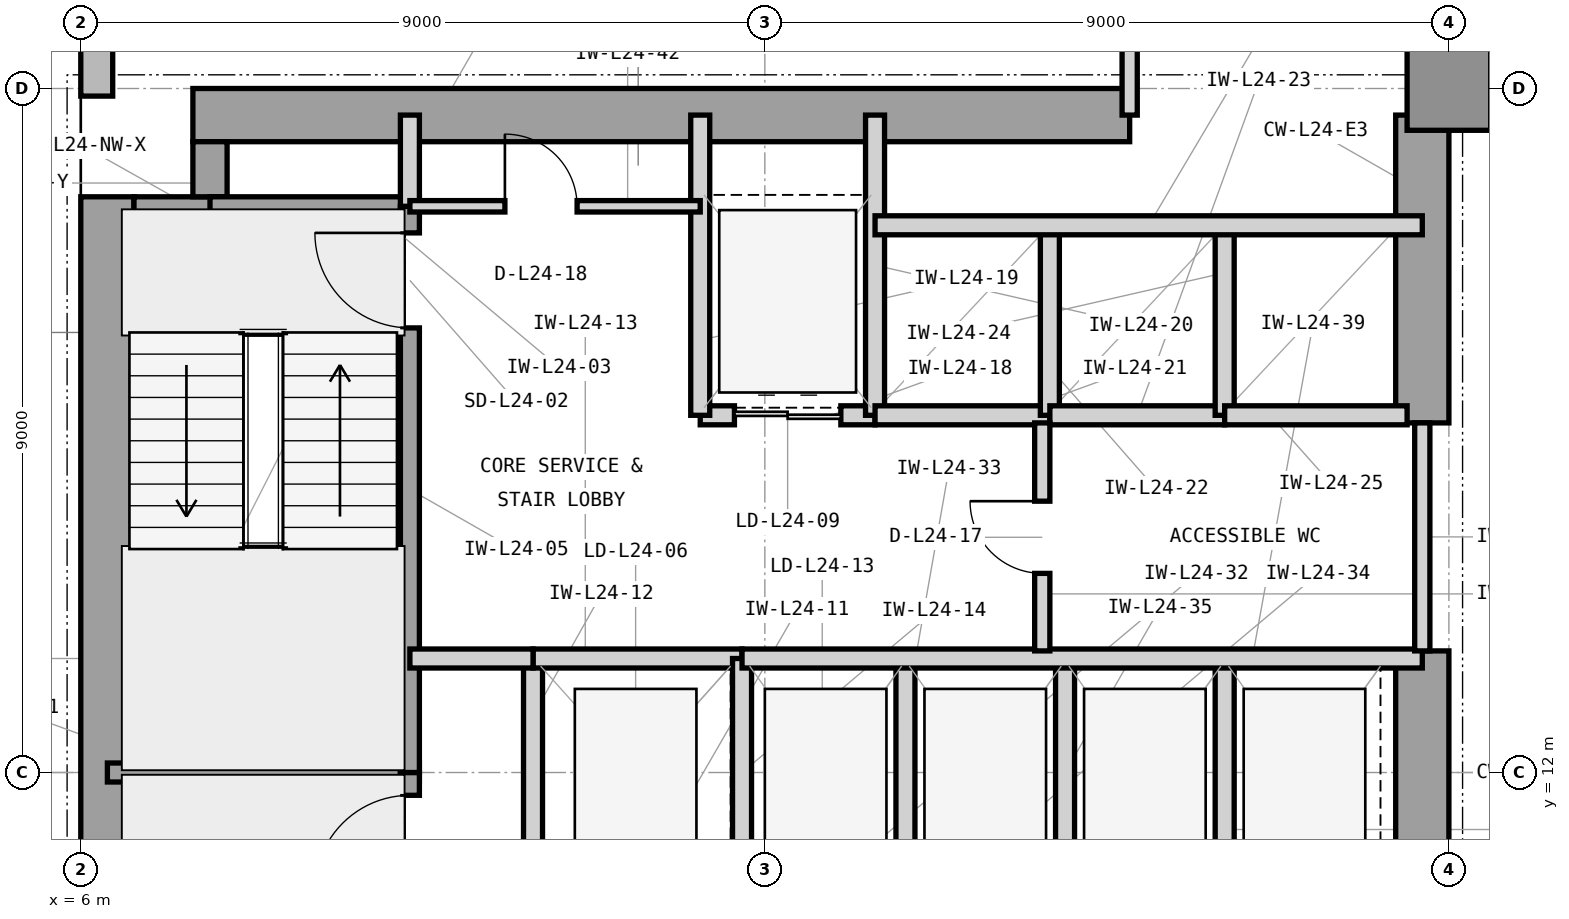
"""IFC4 building model, lengths in metres.
Left out: names, types, materials, properties, quantities, classifications, styles, units other than length and angle.
Written with IfcOpenShell. Run it as: python <this file> out.ifc"""

import sys

from ifc_helpers import new_model, si_unit, direction, frame, frame_2d, origin, origin_2d, place, context, subcontext, project, spatial, rectangle, extrude, element, fill, save


model = new_model("IFC4")
c1 = context("Model", 3, precision=1e-05, world=origin(), true_north=direction((0.0, 1.0)))
c2 = subcontext(c1, "Body", "Model", "MODEL_VIEW")
j1 = project(units=[si_unit("LENGTHUNIT", "METRE"), si_unit("PLANEANGLEUNIT", "RADIAN")], contexts=[c1])
p1 = place(None, origin())
s1 = spatial("IfcSite", under=j1, at=p1, CompositionType="ELEMENT")
p2 = place(p1, origin())
s2 = spatial("IfcBuilding", under=s1, at=p2, CompositionType="ELEMENT")
p3 = place(p2, frame((0.0, 0.0, 105.0)))
s3 = spatial("IfcBuildingStorey", under=s2, at=p3, CompositionType="ELEMENT", Elevation=105.0)
p4 = place(p3, frame((6.35, 4.425, 0.0), z_axis=(0.0, 0.0, 1.0), x_axis=(0.0, 1.0, 0.0)))
e1 = element("IfcWall", 1, at=p4, inside=s3, PredefinedType="SHEAR", context=c2, shape_type="SweptSolid", body=[
    extrude(rectangle(XDim=15.15, YDim=0.7, at=frame_2d((7.575, 0.0))), origin(), (0.0, 0.0, 1.0), 3.9),
])
p5 = place(p3, frame((7.475, 20.65, 0.0), z_axis=(0.0, 0.0, 1.0), x_axis=(1.0, 0.0, 0.0)))
e2 = element("IfcWall", 2, at=p5, inside=s3, PredefinedType="SHEAR", context=c2, shape_type="SweptSolid", body=[
    extrude(rectangle(XDim=12.325, YDim=0.7, at=frame_2d((6.163, 0.0))), origin(), (0.0, 0.0, 1.0), 3.9),
])
p6 = place(p3, frame((23.65, 10.4, 0.0), z_axis=(0.0, 0.0, 1.0), x_axis=(0.0, 1.0, 0.0)))
e3 = element("IfcWall", 3, at=p6, inside=s3, PredefinedType="SHEAR", context=c2, shape_type="SweptSolid", body=[
    extrude(rectangle(XDim=3.2, YDim=0.7, at=frame_2d((1.6, 0.0))), origin(), (0.0, 0.0, 1.0), 3.9),
])
p7 = place(p3, frame((23.65, 16.6, 0.0), z_axis=(0.0, 0.0, 1.0), x_axis=(0.0, 1.0, 0.0)))
e4 = element("IfcWall", 4, at=p7, inside=s3, PredefinedType="SHEAR", context=c2, shape_type="SweptSolid", body=[
    extrude(rectangle(XDim=4.05, YDim=0.7, at=frame_2d((2.025, 0.0))), origin(), (0.0, 0.0, 1.0), 3.9),
])
p8 = place(p3, frame((6.7, 19.35, 0.0), z_axis=(0.0, 0.0, 1.0), x_axis=(1.0, 0.0, 0.0)))
e5 = element("IfcWall", 5, at=p8, inside=s3, PredefinedType="SHEAR", context=c2, shape_type="SweptSolid", body=[
    extrude(rectangle(XDim=1.225, YDim=0.45, at=frame_2d((0.613, 0.0))), origin(), (0.0, 0.0, 1.0), 3.9),
])
p9 = place(p3, frame((7.7, 19.575, 0.0), z_axis=(0.0, 0.0, 1.0), x_axis=(0.0, 1.0, 0.0)))
e6 = element("IfcWall", 6, at=p9, inside=s3, PredefinedType="SHEAR", context=c2, shape_type="SweptSolid", body=[
    extrude(rectangle(XDim=0.725, YDim=0.45, at=frame_2d((0.363, 0.0))), origin(), (0.0, 0.0, 1.0), 3.9),
])
p10 = place(p3, frame((24.0, 21.0, 0.0), z_axis=(0.0, 0.0, 1.0), x_axis=(1.0, 0.0, 0.0)))
e7 = element("IfcColumn", 7, at=p10, inside=s3, PredefinedType="COLUMN", context=c2, shape_type="SweptSolid", body=[
    extrude(rectangle(XDim=1.1, YDim=1.1, at=origin_2d()), origin(), (0.0, 0.0, 1.0), 3.9),
])
p11 = place(p3, frame((61.4, 20.79, 0.0), z_axis=(0.0, 0.0, 1.0), x_axis=(-1.0, 0.0, 0.0)))
e8 = element("IfcWall", 8, at=p11, inside=s3, PredefinedType="STANDARD", context=c2, shape_type="SweptSolid", body=[
    extrude(rectangle(XDim=37.4, YDim=0.42, at=frame_2d((18.7, 0.0))), origin(), (0.0, 0.0, 1.0), 3.7),
])
p12 = place(p11, frame((15.113, 0.0, 0.85)))
e9 = element("IfcOpeningElement", 9, at=p12, cuts=e8, PredefinedType="OPENING", context=c2, shape_type="SweptSolid", body=[
    extrude(rectangle(XDim=2.5, YDim=2.25, at=frame_2d((1.25, 1.125))), frame((0.0, 0.22, 0.0), z_axis=(0.0, -1.0, 0.0), x_axis=(1.0, 0.0, 0.0)), (0.0, 0.0, 1.0), 0.44),
])
p13 = place(p11, frame((24.462, 0.0, 0.85)))
e10 = element("IfcOpeningElement", 10, at=p13, cuts=e8, PredefinedType="OPENING", context=c2, shape_type="SweptSolid", body=[
    extrude(rectangle(XDim=2.5, YDim=2.25, at=frame_2d((1.25, 1.125))), frame((0.0, 0.22, 0.0), z_axis=(0.0, -1.0, 0.0), x_axis=(1.0, 0.0, 0.0)), (0.0, 0.0, 1.0), 0.44),
])
p14 = place(p3, frame((23.79, 21.0, 0.0), z_axis=(0.0, 0.0, 1.0), x_axis=(0.0, 1.0, 0.0)))
e11 = element("IfcWall", 11, at=p14, inside=s3, PredefinedType="STANDARD", context=c2, shape_type="SweptSolid", body=[
    extrude(rectangle(XDim=25.4, YDim=0.42, at=frame_2d((12.7, 0.0))), origin(), (0.0, 0.0, 1.0), 3.7),
])
p15 = place(p14, frame((11.45, 0.0, 0.85)))
e12 = element("IfcOpeningElement", 12, at=p15, cuts=e11, PredefinedType="OPENING", context=c2, shape_type="SweptSolid", body=[
    extrude(rectangle(XDim=2.5, YDim=2.25, at=frame_2d((1.25, 1.125))), frame((0.0, 0.22, 0.0), z_axis=(0.0, -1.0, 0.0), x_axis=(1.0, 0.0, 0.0)), (0.0, 0.0, 1.0), 0.44),
])
p16 = place(p14, frame((18.866, 0.0, 0.85)))
e13 = element("IfcOpeningElement", 13, at=p16, cuts=e11, PredefinedType="OPENING", context=c2, shape_type="SweptSolid", body=[
    extrude(rectangle(XDim=1.2, YDim=2.25, at=frame_2d((0.6, 1.125))), frame((0.0, 0.22, 0.0), z_axis=(0.0, -1.0, 0.0), x_axis=(1.0, 0.0, 0.0)), (0.0, 0.0, 1.0), 0.44),
])
p17 = place(p3, frame((6.21, 46.4, 0.0), z_axis=(0.0, 0.0, 1.0), x_axis=(0.0, -1.0, 0.0)))
e14 = element("IfcWall", 14, at=p17, inside=s3, PredefinedType="STANDARD", context=c2, shape_type="SweptSolid", body=[
    extrude(rectangle(XDim=25.5, YDim=0.42, at=frame_2d((12.75, 0.0))), origin(), (0.0, 0.0, 1.0), 3.7),
])
p18 = place(p17, frame((11.5, 0.0, 0.85)))
e15 = element("IfcOpeningElement", 15, at=p18, cuts=e14, PredefinedType="OPENING", context=c2, shape_type="SweptSolid", body=[
    extrude(rectangle(XDim=2.5, YDim=2.25, at=frame_2d((1.25, 1.125))), frame((0.0, 0.22, 0.0), z_axis=(0.0, -1.0, 0.0), x_axis=(1.0, 0.0, 0.0)), (0.0, 0.0, 1.0), 0.44),
])
p19 = place(p17, frame((5.336, 0.0, 0.85)))
e16 = element("IfcOpeningElement", 16, at=p19, cuts=e14, PredefinedType="OPENING", context=c2, shape_type="SweptSolid", body=[
    extrude(rectangle(XDim=1.2, YDim=2.25, at=frame_2d((0.6, 1.125))), frame((0.0, 0.22, 0.0), z_axis=(0.0, -1.0, 0.0), x_axis=(1.0, 0.0, 0.0)), (0.0, 0.0, 1.0), 0.44),
])
p20 = place(p3, frame((6.35, 12.0, 0.0), z_axis=(0.0, 0.0, 1.0), x_axis=(1.0, 0.0, 0.0)))
e17 = element("IfcWall", 17, at=p20, inside=s3, PredefinedType="SHEAR", context=c2, shape_type="SweptSolid", body=[
    extrude(rectangle(XDim=4.105, YDim=0.25, at=frame_2d((2.052, 0.0))), origin(), (0.0, 0.0, 1.0), 3.9),
])
p21 = place(p3, frame((7.7, 19.45, 0.0), z_axis=(0.0, 0.0, 1.0), x_axis=(1.0, 0.0, 0.0)))
e18 = element("IfcWall", 18, at=p21, inside=s3, PredefinedType="SHEAR", context=c2, shape_type="SweptSolid", body=[
    extrude(rectangle(XDim=2.755, YDim=0.25, at=frame_2d((1.377, 0.0))), origin(), (0.0, 0.0, 1.0), 3.9),
])
p22 = place(p3, frame((10.33, 4.55, 0.0), z_axis=(0.0, 0.0, 1.0), x_axis=(0.0, 1.0, 0.0)))
e19 = element("IfcWall", 19, at=p22, inside=s3, PredefinedType="SHEAR", context=c2, shape_type="SweptSolid", body=[
    extrude(rectangle(XDim=7.45, YDim=0.25, at=frame_2d((3.725, 0.0))), origin(), (0.0, 0.0, 1.0), 3.9),
])
p23 = place(p22, frame((5.9, 0.0, 0.0)))
e20 = element("IfcOpeningElement", 20, at=p23, cuts=e19, PredefinedType="OPENING", context=c2, shape_type="SweptSolid", body=[
    extrude(rectangle(XDim=1.25, YDim=2.2, at=frame_2d((0.625, 1.1))), frame((0.0, 0.135, 0.0), z_axis=(0.0, -1.0, 0.0), x_axis=(1.0, 0.0, 0.0)), (0.0, 0.0, 1.0), 0.27),
])
p24 = place(p3, frame((10.33, 12.0, 0.0), z_axis=(0.0, 0.0, 1.0), x_axis=(0.0, 1.0, 0.0)))
e21 = element("IfcWall", 21, at=p24, inside=s3, PredefinedType="SHEAR", context=c2, shape_type="SweptSolid", body=[
    extrude(rectangle(XDim=7.45, YDim=0.25, at=frame_2d((3.725, 0.0))), origin(), (0.0, 0.0, 1.0), 3.9),
])
p25 = place(p24, frame((5.85, 0.0, 0.0)))
e22 = element("IfcOpeningElement", 22, at=p25, cuts=e21, PredefinedType="OPENING", context=c2, shape_type="SweptSolid", body=[
    extrude(rectangle(XDim=1.25, YDim=2.2, at=frame_2d((0.625, 1.1))), frame((0.0, 0.135, 0.0), z_axis=(0.0, -1.0, 0.0), x_axis=(1.0, 0.0, 0.0)), (0.0, 0.0, 1.0), 0.27),
])
p26 = place(p3, frame((10.33, 19.45, 0.0), z_axis=(0.0, 0.0, 1.0), x_axis=(0.0, 1.0, 0.0)))
e23 = element("IfcWall", 23, at=p26, inside=s3, PredefinedType="PARTITIONING", context=c2, shape_type="SweptSolid", body=[
    extrude(rectangle(XDim=1.2, YDim=0.25, at=frame_2d((0.6, 0.0))), origin(), (0.0, 0.0, 1.0), 2.917),
])
p27 = place(p3, frame((11.95, 10.5, 0.0), z_axis=(0.0, 0.0, 1.0), x_axis=(0.0, 1.0, 0.0)))
e24 = element("IfcWall", 24, at=p27, inside=s3, PredefinedType="PARTITIONING", context=c2, shape_type="SweptSolid", body=[
    extrude(rectangle(XDim=3.0, YDim=0.25, at=frame_2d((1.5, 0.0))), origin(), (0.0, 0.0, 1.0), 3.69),
])
p28 = place(p3, frame((11.95, 13.5, 0.0), z_axis=(0.0, 0.0, 1.0), x_axis=(1.0, 0.0, 0.0)))
e25 = element("IfcWall", 25, at=p28, inside=s3, PredefinedType="PARTITIONING", context=c2, shape_type="SweptSolid", body=[
    extrude(rectangle(XDim=2.75, YDim=0.25, at=frame_2d((1.375, 0.0))), origin(), (0.0, 0.0, 1.0), 3.227),
])
p29 = place(p3, frame((14.7, 10.5, 0.0), z_axis=(0.0, 0.0, 1.0), x_axis=(0.0, 1.0, 0.0)))
e26 = element("IfcWall", 26, at=p29, inside=s3, PredefinedType="PARTITIONING", context=c2, shape_type="SweptSolid", body=[
    extrude(rectangle(XDim=3.0, YDim=0.25, at=frame_2d((1.5, 0.0))), origin(), (0.0, 0.0, 1.0), 3.69),
])
p30 = place(p3, frame((10.33, 13.5, 0.0), z_axis=(0.0, 0.0, 1.0), x_axis=(1.0, 0.0, 0.0)))
e27 = element("IfcWall", 27, at=p30, inside=s3, PredefinedType="PARTITIONING", context=c2, shape_type="SweptSolid", body=[
    extrude(rectangle(XDim=1.62, YDim=0.25, at=frame_2d((0.81, 0.0))), origin(), (0.0, 0.0, 1.0), 3.227),
])
p31 = place(p3, frame((14.15, 16.7, 0.0), z_axis=(0.0, 0.0, 1.0), x_axis=(1.0, 0.0, 0.0)))
e28 = element("IfcWall", 28, at=p31, inside=s3, PredefinedType="PARTITIONING", context=c2, shape_type="SweptSolid", body=[
    extrude(rectangle(XDim=2.3, YDim=0.25, at=frame_2d((1.15, 0.0))), origin(), (0.0, 0.0, 1.0), 3.227),
])
p32 = place(p31, frame((0.45, 0.0, 0.0)))
e29 = element("IfcOpeningElement", 29, at=p32, cuts=e28, PredefinedType="OPENING", context=c2, shape_type="SweptSolid", body=[
    extrude(rectangle(XDim=1.4, YDim=2.35, at=frame_2d((0.7, 1.175))), frame((0.0, 0.135, 0.0), z_axis=(0.0, -1.0, 0.0), x_axis=(1.0, 0.0, 0.0)), (0.0, 0.0, 1.0), 0.27),
])
for number, where, z_axis, x_axis in (
    (30, (14.15, 16.7, 0.0), (0.0, 0.0, 1.0), (0.0, 1.0, 0.0)),
    (31, (16.45, 16.7, 0.0), (0.0, 0.0, 1.0), (0.0, 1.0, 0.0)),
):
    element("IfcWall", number, at=place(p3, frame(where, z_axis=z_axis, x_axis=x_axis)), inside=s3, PredefinedType="PARTITIONING", context=c2, shape_type="SweptSolid", body=[
        extrude(rectangle(XDim=3.95, YDim=0.25, at=frame_2d((1.975, 0.0))), origin(), (0.0, 0.0, 1.0), 3.69),
    ])
p33 = place(p3, frame((16.45, 16.7, 0.0), z_axis=(0.0, 0.0, 1.0), x_axis=(1.0, 0.0, 0.0)))
e32 = element("IfcWall", 32, at=p33, inside=s3, PredefinedType="PARTITIONING", context=c2, shape_type="SweptSolid", body=[
    extrude(rectangle(XDim=2.3, YDim=0.25, at=frame_2d((1.15, 0.0))), origin(), (0.0, 0.0, 1.0), 3.227),
])
p34 = place(p3, frame((18.75, 16.7, 0.0), z_axis=(0.0, 0.0, 1.0), x_axis=(0.0, 1.0, 0.0)))
e33 = element("IfcWall", 33, at=p34, inside=s3, PredefinedType="PARTITIONING", context=c2, shape_type="SweptSolid", body=[
    extrude(rectangle(XDim=2.5, YDim=0.25, at=frame_2d((1.25, 0.0))), origin(), (0.0, 0.0, 1.0), 3.69),
])
p35 = place(p3, frame((18.75, 16.7, 0.0), z_axis=(0.0, 0.0, 1.0), x_axis=(1.0, 0.0, 0.0)))
e34 = element("IfcWall", 34, at=p35, inside=s3, PredefinedType="PARTITIONING", context=c2, shape_type="SweptSolid", body=[
    extrude(rectangle(XDim=2.3, YDim=0.25, at=frame_2d((1.15, 0.0))), origin(), (0.0, 0.0, 1.0), 3.227),
])
p36 = place(p3, frame((21.05, 16.7, 0.0), z_axis=(0.0, 0.0, 1.0), x_axis=(0.0, 1.0, 0.0)))
e35 = element("IfcWall", 35, at=p36, inside=s3, PredefinedType="PARTITIONING", context=c2, shape_type="SweptSolid", body=[
    extrude(rectangle(XDim=2.5, YDim=0.25, at=frame_2d((1.25, 0.0))), origin(), (0.0, 0.0, 1.0), 3.69),
])
p37 = place(p3, frame((21.05, 16.7, 0.0), z_axis=(0.0, 0.0, 1.0), x_axis=(1.0, 0.0, 0.0)))
e36 = element("IfcWall", 36, at=p37, inside=s3, PredefinedType="PARTITIONING", context=c2, shape_type="SweptSolid", body=[
    extrude(rectangle(XDim=2.4, YDim=0.25, at=frame_2d((1.2, 0.0))), origin(), (0.0, 0.0, 1.0), 3.227),
])
p38 = place(p3, frame((16.45, 19.2, 0.0), z_axis=(0.0, 0.0, 1.0), x_axis=(1.0, 0.0, 0.0)))
e37 = element("IfcWall", 37, at=p38, inside=s3, PredefinedType="PARTITIONING", context=c2, shape_type="SweptSolid", body=[
    extrude(rectangle(XDim=7.2, YDim=0.25, at=frame_2d((3.6, 0.0))), origin(), (0.0, 0.0, 1.0), 3.69),
])
for number, where, z_axis, x_axis in (
    (38, (16.85, 10.5, 0.0), (0.0, 0.0, 1.0), (0.0, 1.0, 0.0)),
    (39, (18.95, 10.5, 0.0), (0.0, 0.0, 1.0), (0.0, 1.0, 0.0)),
    (40, (21.05, 10.5, 0.0), (0.0, 0.0, 1.0), (0.0, 1.0, 0.0)),
):
    element("IfcWall", number, at=place(p3, frame(where, z_axis=z_axis, x_axis=x_axis)), inside=s3, PredefinedType="PARTITIONING", context=c2, shape_type="SweptSolid", body=[
        extrude(rectangle(XDim=3.0, YDim=0.25, at=frame_2d((1.5, 0.0))), origin(), (0.0, 0.0, 1.0), 3.69),
    ])
p39 = place(p3, frame((14.7, 13.5, 0.0), z_axis=(0.0, 0.0, 1.0), x_axis=(1.0, 0.0, 0.0)))
e41 = element("IfcWall", 41, at=p39, inside=s3, PredefinedType="PARTITIONING", context=c2, shape_type="SweptSolid", body=[
    extrude(rectangle(XDim=8.95, YDim=0.25, at=frame_2d((4.475, 0.0))), origin(), (0.0, 0.0, 1.0), 3.227),
])
p40 = place(p3, frame((18.65, 13.6, 0.0), z_axis=(0.0, 0.0, 1.0), x_axis=(0.0, 1.0, 0.0)))
e42 = element("IfcWall", 42, at=p40, inside=s3, PredefinedType="PARTITIONING", context=c2, shape_type="SweptSolid", body=[
    extrude(rectangle(XDim=3.0, YDim=0.2, at=frame_2d((1.5, 0.0))), origin(), (0.0, 0.0, 1.0), 3.69),
])
p41 = place(p40, frame((1.02, 0.0, 0.0)))
e43 = element("IfcOpeningElement", 43, at=p41, cuts=e42, PredefinedType="OPENING", context=c2, shape_type="SweptSolid", body=[
    extrude(rectangle(XDim=0.95, YDim=2.1, at=frame_2d((0.475, 1.05))), frame((0.0, 0.11, 0.0), z_axis=(0.0, -1.0, 0.0), x_axis=(1.0, 0.0, 0.0)), (0.0, 0.0, 1.0), 0.22),
])
p42 = place(p3, frame((23.65, 13.6, 0.0), z_axis=(0.0, 0.0, 1.0), x_axis=(0.0, 1.0, 0.0)))
e44 = element("IfcWall", 44, at=p42, inside=s3, PredefinedType="PARTITIONING", context=c2, shape_type="SweptSolid", body=[
    extrude(rectangle(XDim=3.0, YDim=0.2, at=frame_2d((1.5, 0.0))), origin(), (0.0, 0.0, 1.0), 3.69),
])
p43 = place(p3, frame((10.33, 19.45, 0.0), z_axis=(0.0, 0.0, 1.0), x_axis=(1.0, 0.0, 0.0)))
e45 = element("IfcWall", 45, at=p43, inside=s3, PredefinedType="PARTITIONING", context=c2, shape_type="SweptSolid", body=[
    extrude(rectangle(XDim=3.82, YDim=0.15, at=frame_2d((1.91, 0.0))), origin(), (0.0, 0.0, 1.0), 3.69),
])
p44 = place(p43, frame((1.25, 0.0, 0.0)))
e46 = element("IfcOpeningElement", 46, at=p44, cuts=e45, PredefinedType="OPENING", context=c2, shape_type="SweptSolid", body=[
    extrude(rectangle(XDim=0.95, YDim=2.1, at=frame_2d((0.475, 1.05))), frame((0.0, 0.085, 0.0), z_axis=(0.0, -1.0, 0.0), x_axis=(1.0, 0.0, 0.0)), (0.0, 0.0, 1.0), 0.17),
])
p45 = place(p3, frame((19.8, 20.65, 0.0), z_axis=(0.0, 0.0, 1.0), x_axis=(0.0, 1.0, 0.0)))
e47 = element("IfcWall", 47, at=p45, inside=s3, PredefinedType="PARTITIONING", context=c2, shape_type="SweptSolid", body=[
    extrude(rectangle(XDim=6.15, YDim=0.2, at=frame_2d((3.075, 0.0))), origin(), (0.0, 0.0, 1.0), 3.69),
])
p46 = place(p23, origin())
e48 = element("IfcDoor", 48, at=p46, inside=s3, OperationType="SINGLE_SWING_LEFT", PredefinedType="DOOR", context=c2, shape_type="SweptSolid", body=[
    extrude(rectangle(XDim=1.25, YDim=2.2, at=frame_2d((0.625, 1.1))), frame((0.0, 0.025, 0.0), z_axis=(0.0, -1.0, 0.0), x_axis=(1.0, 0.0, 0.0)), (0.0, 0.0, 1.0), 0.05),
])
fill(e20, e48)
p47 = place(p25, origin())
e49 = element("IfcDoor", 49, at=p47, inside=s3, OperationType="SINGLE_SWING_RIGHT", PredefinedType="DOOR", context=c2, shape_type="SweptSolid", body=[
    extrude(rectangle(XDim=1.25, YDim=2.2, at=frame_2d((0.625, 1.1))), frame((0.0, 0.025, 0.0), z_axis=(0.0, -1.0, 0.0), x_axis=(1.0, 0.0, 0.0)), (0.0, 0.0, 1.0), 0.05),
])
fill(e22, e49)
p48 = place(p32, origin())
e50 = element("IfcDoor", 50, at=p48, inside=s3, OperationType="DOUBLE_DOOR_SLIDING", PredefinedType="DOOR", context=c2, shape_type="SweptSolid", body=[
    extrude(rectangle(XDim=1.4, YDim=2.35, at=frame_2d((0.7, 1.175))), frame((0.0, 0.025, 0.0), z_axis=(0.0, -1.0, 0.0), x_axis=(1.0, 0.0, 0.0)), (0.0, 0.0, 1.0), 0.05),
])
fill(e29, e50)
p49 = place(p41, origin())
e51 = element("IfcDoor", 51, at=p49, inside=s3, OperationType="SINGLE_SWING_RIGHT", PredefinedType="DOOR", context=c2, shape_type="SweptSolid", body=[
    extrude(rectangle(XDim=0.95, YDim=2.1, at=frame_2d((0.475, 1.05))), frame((0.0, 0.025, 0.0), z_axis=(0.0, -1.0, 0.0), x_axis=(1.0, 0.0, 0.0)), (0.0, 0.0, 1.0), 0.05),
])
fill(e43, e51)
p50 = place(p44, origin())
e52 = element("IfcDoor", 52, at=p50, inside=s3, OperationType="SINGLE_SWING_LEFT", PredefinedType="DOOR", context=c2, shape_type="SweptSolid", body=[
    extrude(rectangle(XDim=0.95, YDim=2.1, at=frame_2d((0.475, 1.05))), frame((0.0, 0.025, 0.0), z_axis=(0.0, -1.0, 0.0), x_axis=(1.0, 0.0, 0.0)), (0.0, 0.0, 1.0), 0.05),
])
fill(e46, e52)
save(model, sys.argv[1])
